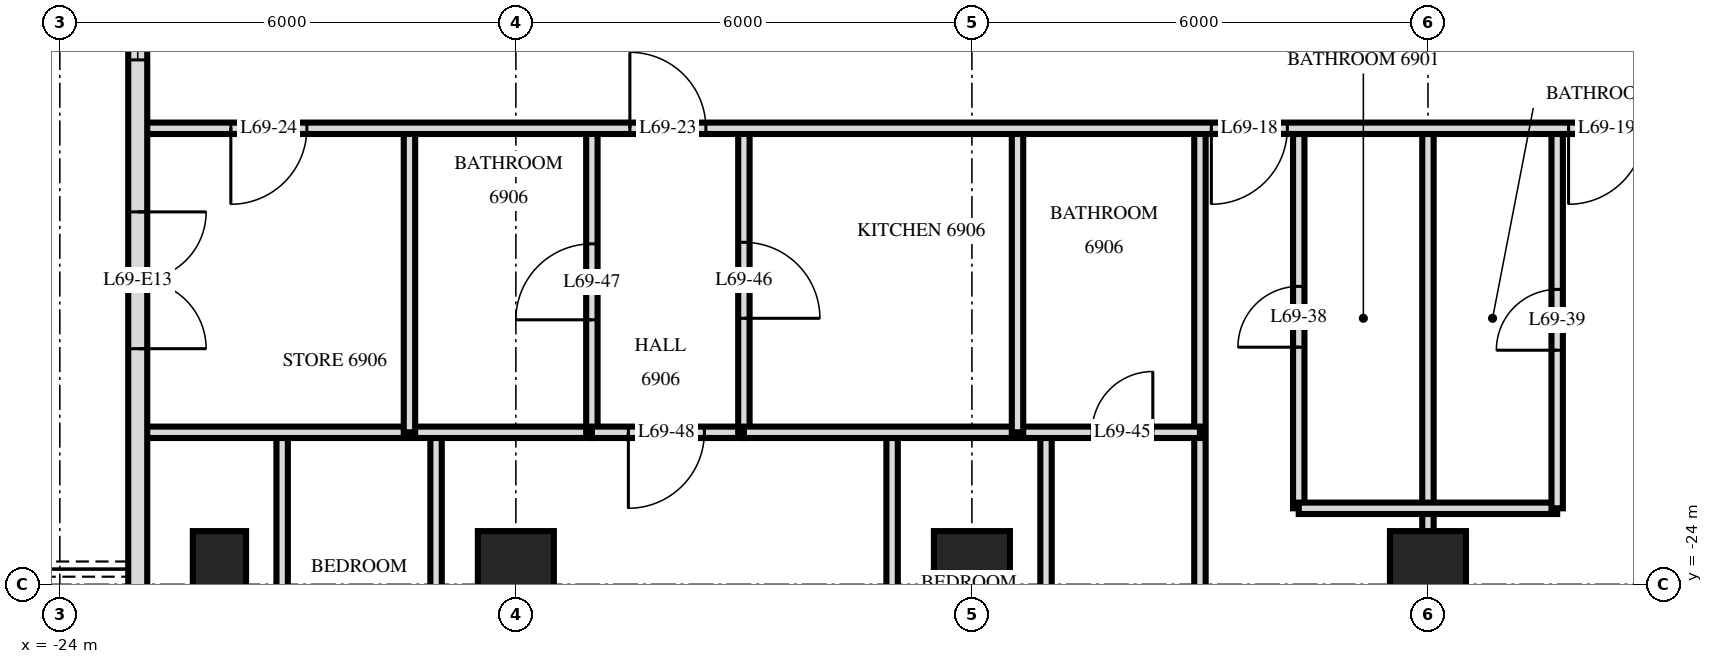
"""IFC4 building model, lengths in metres.
Left out: names, types, materials, properties, quantities, classifications, styles, units other than length and angle.
Written with IfcOpenShell. Run it as: python <this file> out.ifc"""

import sys

from ifc_helpers import new_model, si_unit, direction, frame, frame_2d, origin, origin_2d, place, context, subcontext, project, spatial, rectangle, extrude, element, fill, save


model = new_model("IFC4")
c1 = context("Model", 3, precision=1e-05, world=origin(), true_north=direction((0.0, 1.0)))
c2 = subcontext(c1, "Body", "Model", "MODEL_VIEW")
j1 = project(units=[si_unit("LENGTHUNIT", "METRE"), si_unit("PLANEANGLEUNIT", "RADIAN")], contexts=[c1])
p1 = place(None, origin())
s1 = spatial("IfcSite", under=j1, at=p1, CompositionType="ELEMENT")
p2 = place(p1, origin())
s2 = spatial("IfcBuilding", under=s1, at=p2, CompositionType="ELEMENT")
p3 = place(p2, frame((0.0, 0.0, 263.1)))
s3 = spatial("IfcBuildingStorey", under=s2, at=p3, CompositionType="ELEMENT", Elevation=263.1)
p4 = place(p3, frame((-21.9, -23.8, 0.0), z_axis=(0.0, 0.0, 1.0), x_axis=(0.0, 1.0, 0.0)))
e1 = element("IfcColumn", 1, at=p4, inside=s3, PredefinedType="COLUMN", context=c2, shape_type="SweptSolid", body=[
    extrude(rectangle(XDim=1.0, YDim=0.7, at=origin_2d()), origin(), (0.0, 0.0, 1.0), 3.5),
])
for number, where, z_axis, x_axis in (
    (2, (-18.0, -23.8, 0.0), (0.0, 0.0, 1.0), (1.0, 0.0, 0.0)),
    (3, (-12.0, -23.8, 0.0), (0.0, 0.0, 1.0), (1.0, 0.0, 0.0)),
    (4, (-6.0, -23.8, 0.0), (0.0, 0.0, 1.0), (1.0, 0.0, 0.0)),
):
    element("IfcColumn", number, at=place(p3, frame(where, z_axis=z_axis, x_axis=x_axis)), inside=s3, PredefinedType="COLUMN", context=c2, shape_type="SweptSolid", body=[
        extrude(rectangle(XDim=1.0, YDim=1.0, at=origin_2d()), origin(), (0.0, 0.0, 1.0), 3.5),
    ])
p5 = place(p3, frame((-22.975, -3.325, 0.0), z_axis=(0.0, 0.0, 1.0), x_axis=(0.0, -1.0, 0.0)))
e5 = element("IfcWall", 5, at=p5, inside=s3, PredefinedType="SOLIDWALL", context=c2, shape_type="SweptSolid", body=[
    extrude(rectangle(XDim=25.951, YDim=0.25, at=frame_2d((12.975, 0.0))), origin(), (0.0, 0.0, 1.0), 3.22),
])
p6 = place(p5, frame((1.925, 0.0, 0.0)))
e6 = element("IfcOpeningElement", 6, at=p6, cuts=e5, PredefinedType="OPENING", context=c2, shape_type="SweptSolid", body=[
    extrude(rectangle(XDim=1.8, YDim=2.4, at=frame_2d((0.9, 1.2))), frame((0.0, 0.135, 0.0), z_axis=(0.0, -1.0, 0.0), x_axis=(1.0, 0.0, 0.0)), (0.0, 0.0, 1.0), 0.27),
])
p7 = place(p5, frame((7.975, 0.0, 0.0)))
e7 = element("IfcOpeningElement", 7, at=p7, cuts=e5, PredefinedType="OPENING", context=c2, shape_type="SweptSolid", body=[
    extrude(rectangle(XDim=1.8, YDim=2.4, at=frame_2d((0.9, 1.2))), frame((0.0, 0.135, 0.0), z_axis=(0.0, -1.0, 0.0), x_axis=(1.0, 0.0, 0.0)), (0.0, 0.0, 1.0), 0.27),
])
p8 = place(p5, frame((12.575, 0.0, 0.9)))
e8 = element("IfcOpeningElement", 8, at=p8, cuts=e5, PredefinedType="OPENING", context=c2, shape_type="SweptSolid", body=[
    extrude(rectangle(XDim=1.2, YDim=1.5, at=frame_2d((0.6, 0.75))), frame((0.0, 0.135, 0.0), z_axis=(0.0, -1.0, 0.0), x_axis=(1.0, 0.0, 0.0)), (0.0, 0.0, 1.0), 0.27),
])
p9 = place(p5, frame((15.775, 0.0, 0.0)))
e9 = element("IfcOpeningElement", 9, at=p9, cuts=e5, PredefinedType="OPENING", context=c2, shape_type="SweptSolid", body=[
    extrude(rectangle(XDim=1.8, YDim=2.4, at=frame_2d((0.9, 1.2))), frame((0.0, 0.135, 0.0), z_axis=(0.0, -1.0, 0.0), x_axis=(1.0, 0.0, 0.0)), (0.0, 0.0, 1.0), 0.27),
])
p10 = place(p5, frame((21.075, 0.0, 0.0)))
e10 = element("IfcOpeningElement", 10, at=p10, cuts=e5, PredefinedType="OPENING", context=c2, shape_type="SweptSolid", body=[
    extrude(rectangle(XDim=1.8, YDim=2.4, at=frame_2d((0.9, 1.2))), frame((0.0, 0.135, 0.0), z_axis=(0.0, -1.0, 0.0), x_axis=(1.0, 0.0, 0.0)), (0.0, 0.0, 1.0), 0.27),
])
p11 = place(p5, frame((23.825, 0.0, 0.9)))
e11 = element("IfcOpeningElement", 11, at=p11, cuts=e5, PredefinedType="OPENING", context=c2, shape_type="SweptSolid", body=[
    extrude(rectangle(XDim=1.8, YDim=1.5, at=frame_2d((0.9, 0.75))), frame((0.0, 0.135, 0.0), z_axis=(0.0, -1.0, 0.0), x_axis=(1.0, 0.0, 0.0)), (0.0, 0.0, 1.0), 0.27),
])
p12 = place(p3, frame((-4.3, -23.0, 0.0), z_axis=(0.0, 0.0, 1.0), x_axis=(0.0, 1.0, 0.0)))
e12 = element("IfcWall", 12, at=p12, inside=s3, PredefinedType="PARTITIONING", context=c2, shape_type="SweptSolid", body=[
    extrude(rectangle(XDim=5.0, YDim=0.15, at=frame_2d((2.5, 0.0))), origin(), (0.0, 0.0, 1.0), 3.22),
])
p13 = place(p12, frame((2.08, 0.0, 0.0)))
e13 = element("IfcOpeningElement", 13, at=p13, cuts=e12, PredefinedType="OPENING", context=c2, shape_type="SweptSolid", body=[
    extrude(rectangle(XDim=0.8, YDim=2.1, at=frame_2d((0.4, 1.05))), frame((0.0, 0.085, 0.0), z_axis=(0.0, -1.0, 0.0), x_axis=(1.0, 0.0, 0.0)), (0.0, 0.0, 1.0), 0.17),
])
p14 = place(p3, frame((-6.0, -33.62, 0.0), z_axis=(0.0, 0.0, 1.0), x_axis=(0.0, 1.0, 0.0)))
e14 = element("IfcWall", 14, at=p14, inside=s3, PredefinedType="PARTITIONING", context=c2, shape_type="SweptSolid", body=[
    extrude(rectangle(XDim=15.62, YDim=0.15, at=frame_2d((7.81, 0.0))), origin(), (0.0, 0.0, 1.0), 3.22),
])
p15 = place(p3, frame((-7.7, -23.0, 0.0), z_axis=(0.0, 0.0, 1.0), x_axis=(0.0, 1.0, 0.0)))
e15 = element("IfcWall", 15, at=p15, inside=s3, PredefinedType="PARTITIONING", context=c2, shape_type="SweptSolid", body=[
    extrude(rectangle(XDim=5.0, YDim=0.15, at=frame_2d((2.5, 0.0))), origin(), (0.0, 0.0, 1.0), 3.22),
])
p16 = place(p15, frame((2.12, 0.0, 0.0)))
e16 = element("IfcOpeningElement", 16, at=p16, cuts=e15, PredefinedType="OPENING", context=c2, shape_type="SweptSolid", body=[
    extrude(rectangle(XDim=0.8, YDim=2.1, at=frame_2d((0.4, 1.05))), frame((0.0, 0.085, 0.0), z_axis=(0.0, -1.0, 0.0), x_axis=(1.0, 0.0, 0.0)), (0.0, 0.0, 1.0), 0.17),
])
p17 = place(p3, frame((-9.0, -33.62, 0.0), z_axis=(0.0, 0.0, 1.0), x_axis=(0.0, 1.0, 0.0)))
e17 = element("IfcWall", 17, at=p17, inside=s3, PredefinedType="PARTITIONING", context=c2, shape_type="SweptSolid", body=[
    extrude(rectangle(XDim=15.62, YDim=0.15, at=frame_2d((7.81, 0.0))), origin(), (0.0, 0.0, 1.0), 3.22),
])
p18 = place(p3, frame((-11.025, -33.62, 0.0), z_axis=(0.0, 0.0, 1.0), x_axis=(0.0, 1.0, 0.0)))
e18 = element("IfcWall", 18, at=p18, inside=s3, PredefinedType="PARTITIONING", context=c2, shape_type="SweptSolid", body=[
    extrude(rectangle(XDim=11.62, YDim=0.15, at=frame_2d((5.81, 0.0))), origin(), (0.0, 0.0, 1.0), 3.22),
])
p19 = place(p18, frame((5.25, 0.0, 0.0)))
e19 = element("IfcOpeningElement", 19, at=p19, cuts=e18, PredefinedType="OPENING", context=c2, shape_type="SweptSolid", body=[
    extrude(rectangle(XDim=0.9, YDim=2.1, at=frame_2d((0.45, 1.05))), frame((0.0, 0.085, 0.0), z_axis=(0.0, -1.0, 0.0), x_axis=(1.0, 0.0, 0.0)), (0.0, 0.0, 1.0), 0.17),
])
p20 = place(p3, frame((-11.4, -22.0, 0.0), z_axis=(0.0, 0.0, 1.0), x_axis=(0.0, 1.0, 0.0)))
e20 = element("IfcWall", 20, at=p20, inside=s3, PredefinedType="PARTITIONING", context=c2, shape_type="SweptSolid", body=[
    extrude(rectangle(XDim=4.0, YDim=0.15, at=frame_2d((2.0, 0.0))), origin(), (0.0, 0.0, 1.0), 3.22),
])
p21 = place(p3, frame((-13.05, -33.62, 0.0), z_axis=(0.0, 0.0, 1.0), x_axis=(0.0, 1.0, 0.0)))
e21 = element("IfcWall", 21, at=p21, inside=s3, PredefinedType="PARTITIONING", context=c2, shape_type="SweptSolid", body=[
    extrude(rectangle(XDim=11.62, YDim=0.15, at=frame_2d((5.81, 0.0))), origin(), (0.0, 0.0, 1.0), 3.22),
])
p22 = place(p21, frame((5.25, 0.0, 0.0)))
e22 = element("IfcOpeningElement", 22, at=p22, cuts=e21, PredefinedType="OPENING", context=c2, shape_type="SweptSolid", body=[
    extrude(rectangle(XDim=0.9, YDim=2.1, at=frame_2d((0.45, 1.05))), frame((0.0, 0.085, 0.0), z_axis=(0.0, -1.0, 0.0), x_axis=(1.0, 0.0, 0.0)), (0.0, 0.0, 1.0), 0.17),
])
p23 = place(p3, frame((-15.0, -22.0, 0.0), z_axis=(0.0, 0.0, 1.0), x_axis=(0.0, 1.0, 0.0)))
e23 = element("IfcWall", 23, at=p23, inside=s3, PredefinedType="PARTITIONING", context=c2, shape_type="SweptSolid", body=[
    extrude(rectangle(XDim=4.0, YDim=0.15, at=frame_2d((2.0, 0.0))), origin(), (0.0, 0.0, 1.0), 3.22),
])
p24 = place(p23, frame((1.5, 0.0, 0.0)))
e24 = element("IfcOpeningElement", 24, at=p24, cuts=e23, PredefinedType="OPENING", context=c2, shape_type="SweptSolid", body=[
    extrude(rectangle(XDim=1.0, YDim=2.1, at=frame_2d((0.5, 1.05))), frame((0.0, 0.085, 0.0), z_axis=(0.0, -1.0, 0.0), x_axis=(1.0, 0.0, 0.0)), (0.0, 0.0, 1.0), 0.17),
])
p25 = place(p3, frame((-17.0, -22.0, 0.0), z_axis=(0.0, 0.0, 1.0), x_axis=(0.0, 1.0, 0.0)))
e25 = element("IfcWall", 25, at=p25, inside=s3, PredefinedType="PARTITIONING", context=c2, shape_type="SweptSolid", body=[
    extrude(rectangle(XDim=4.0, YDim=0.15, at=frame_2d((2.0, 0.0))), origin(), (0.0, 0.0, 1.0), 3.22),
])
p26 = place(p25, frame((1.48, 0.0, 0.0)))
e26 = element("IfcOpeningElement", 26, at=p26, cuts=e25, PredefinedType="OPENING", context=c2, shape_type="SweptSolid", body=[
    extrude(rectangle(XDim=1.0, YDim=2.1, at=frame_2d((0.5, 1.05))), frame((0.0, 0.085, 0.0), z_axis=(0.0, -1.0, 0.0), x_axis=(1.0, 0.0, 0.0)), (0.0, 0.0, 1.0), 0.17),
])
p27 = place(p3, frame((-19.05, -33.527, 0.0), z_axis=(0.0, 0.0, 1.0), x_axis=(0.0, 1.0, 0.0)))
e27 = element("IfcWall", 27, at=p27, inside=s3, PredefinedType="PARTITIONING", context=c2, shape_type="SweptSolid", body=[
    extrude(rectangle(XDim=11.527, YDim=0.15, at=frame_2d((5.764, 0.0))), origin(), (0.0, 0.0, 1.0), 3.22),
])
p28 = place(p27, frame((5.236, 0.0, 0.0)))
e28 = element("IfcOpeningElement", 28, at=p28, cuts=e27, PredefinedType="OPENING", context=c2, shape_type="SweptSolid", body=[
    extrude(rectangle(XDim=0.9, YDim=2.1, at=frame_2d((0.45, 1.05))), frame((0.0, 0.085, 0.0), z_axis=(0.0, -1.0, 0.0), x_axis=(1.0, 0.0, 0.0)), (0.0, 0.0, 1.0), 0.17),
])
p29 = place(p3, frame((-19.4, -22.0, 0.0), z_axis=(0.0, 0.0, 1.0), x_axis=(0.0, 1.0, 0.0)))
e29 = element("IfcWall", 29, at=p29, inside=s3, PredefinedType="PARTITIONING", context=c2, shape_type="SweptSolid", body=[
    extrude(rectangle(XDim=4.0, YDim=0.15, at=frame_2d((2.0, 0.0))), origin(), (0.0, 0.0, 1.0), 3.22),
])
p30 = place(p3, frame((-21.075, -32.666, 0.0), z_axis=(0.0, 0.0, 1.0), x_axis=(0.0, 1.0, 0.0)))
e30 = element("IfcWall", 30, at=p30, inside=s3, PredefinedType="PARTITIONING", context=c2, shape_type="SweptSolid", body=[
    extrude(rectangle(XDim=10.666, YDim=0.15, at=frame_2d((5.333, 0.0))), origin(), (0.0, 0.0, 1.0), 3.22),
])
p31 = place(p30, frame((4.732, 0.0, 0.0)))
e31 = element("IfcOpeningElement", 31, at=p31, cuts=e30, PredefinedType="OPENING", context=c2, shape_type="SweptSolid", body=[
    extrude(rectangle(XDim=0.9, YDim=2.1, at=frame_2d((0.45, 1.05))), frame((0.0, 0.085, 0.0), z_axis=(0.0, -1.0, 0.0), x_axis=(1.0, 0.0, 0.0)), (0.0, 0.0, 1.0), 0.17),
])
p32 = place(p3, frame((-7.7, -23.0, 0.0), z_axis=(0.0, 0.0, 1.0), x_axis=(1.0, 0.0, 0.0)))
e32 = element("IfcWall", 32, at=p32, inside=s3, PredefinedType="PARTITIONING", context=c2, shape_type="SweptSolid", body=[
    extrude(rectangle(XDim=3.4, YDim=0.15, at=frame_2d((1.7, 0.0))), origin(), (0.0, 0.0, 1.0), 3.22),
])
p33 = place(p3, frame((-17.0, -22.0, 0.0), z_axis=(0.0, 0.0, 1.0), x_axis=(1.0, 0.0, 0.0)))
e33 = element("IfcWall", 33, at=p33, inside=s3, PredefinedType="PARTITIONING", context=c2, shape_type="SweptSolid", body=[
    extrude(rectangle(XDim=2.0, YDim=0.15, at=frame_2d((1.0, 0.0))), origin(), (0.0, 0.0, 1.0), 3.22),
])
p34 = place(p33, frame((0.48, 0.0, 0.0)))
e34 = element("IfcOpeningElement", 34, at=p34, cuts=e33, PredefinedType="OPENING", context=c2, shape_type="SweptSolid", body=[
    extrude(rectangle(XDim=1.0, YDim=2.1, at=frame_2d((0.5, 1.05))), frame((0.0, 0.085, 0.0), z_axis=(0.0, -1.0, 0.0), x_axis=(1.0, 0.0, 0.0)), (0.0, 0.0, 1.0), 0.17),
])
p35 = place(p3, frame((-22.92, -22.0, 0.0), z_axis=(0.0, 0.0, 1.0), x_axis=(1.0, 0.0, 0.0)))
e35 = element("IfcWall", 35, at=p35, inside=s3, PredefinedType="PARTITIONING", context=c2, shape_type="SweptSolid", body=[
    extrude(rectangle(XDim=5.92, YDim=0.15, at=frame_2d((2.96, 0.0))), origin(), (0.0, 0.0, 1.0), 3.22),
])
p36 = place(p3, frame((-15.0, -22.0, 0.0), z_axis=(0.0, 0.0, 1.0), x_axis=(1.0, 0.0, 0.0)))
e36 = element("IfcWall", 36, at=p36, inside=s3, PredefinedType="PARTITIONING", context=c2, shape_type="SweptSolid", body=[
    extrude(rectangle(XDim=6.0, YDim=0.15, at=frame_2d((3.0, 0.0))), origin(), (0.0, 0.0, 1.0), 3.22),
])
p37 = place(p36, frame((4.58, 0.0, 0.0)))
e37 = element("IfcOpeningElement", 37, at=p37, cuts=e36, PredefinedType="OPENING", context=c2, shape_type="SweptSolid", body=[
    extrude(rectangle(XDim=0.8, YDim=2.1, at=frame_2d((0.4, 1.05))), frame((0.0, 0.085, 0.0), z_axis=(0.0, -1.0, 0.0), x_axis=(1.0, 0.0, 0.0)), (0.0, 0.0, 1.0), 0.17),
])
p38 = place(p3, frame((-22.92, -18.0, 0.0), z_axis=(0.0, 0.0, 1.0), x_axis=(1.0, 0.0, 0.0)))
e38 = element("IfcWall", 38, at=p38, inside=s3, PredefinedType="PARTITIONING", context=c2, shape_type="SweptSolid", body=[
    extrude(rectangle(XDim=45.84, YDim=0.15, at=frame_2d((22.92, 0.0))), origin(), (0.0, 0.0, 1.0), 3.22),
])
p39 = place(p38, frame((14.07, 0.0, 0.0)))
e39 = element("IfcOpeningElement", 39, at=p39, cuts=e38, PredefinedType="OPENING", context=c2, shape_type="SweptSolid", body=[
    extrude(rectangle(XDim=1.0, YDim=2.1, at=frame_2d((0.5, 1.05))), frame((0.0, 0.085, 0.0), z_axis=(0.0, -1.0, 0.0), x_axis=(1.0, 0.0, 0.0)), (0.0, 0.0, 1.0), 0.17),
])
p40 = place(p38, frame((18.77, 0.0, 0.0)))
e40 = element("IfcOpeningElement", 40, at=p40, cuts=e38, PredefinedType="OPENING", context=c2, shape_type="SweptSolid", body=[
    extrude(rectangle(XDim=1.0, YDim=2.1, at=frame_2d((0.5, 1.05))), frame((0.0, 0.085, 0.0), z_axis=(0.0, -1.0, 0.0), x_axis=(1.0, 0.0, 0.0)), (0.0, 0.0, 1.0), 0.17),
])
p41 = place(p38, frame((20.07, 0.0, 0.0)))
e41 = element("IfcOpeningElement", 41, at=p41, cuts=e38, PredefinedType="OPENING", context=c2, shape_type="SweptSolid", body=[
    extrude(rectangle(XDim=1.0, YDim=2.1, at=frame_2d((0.5, 1.05))), frame((0.0, 0.085, 0.0), z_axis=(0.0, -1.0, 0.0), x_axis=(1.0, 0.0, 0.0)), (0.0, 0.0, 1.0), 0.17),
])
p42 = place(p38, frame((25.57, 0.0, 0.0)))
e42 = element("IfcOpeningElement", 42, at=p42, cuts=e38, PredefinedType="OPENING", context=c2, shape_type="SweptSolid", body=[
    extrude(rectangle(XDim=1.0, YDim=2.1, at=frame_2d((0.5, 1.05))), frame((0.0, 0.085, 0.0), z_axis=(0.0, -1.0, 0.0), x_axis=(1.0, 0.0, 0.0)), (0.0, 0.0, 1.0), 0.17),
])
p43 = place(p38, frame((29.07, 0.0, 0.0)))
e43 = element("IfcOpeningElement", 43, at=p43, cuts=e38, PredefinedType="OPENING", context=c2, shape_type="SweptSolid", body=[
    extrude(rectangle(XDim=1.0, YDim=2.1, at=frame_2d((0.5, 1.05))), frame((0.0, 0.085, 0.0), z_axis=(0.0, -1.0, 0.0), x_axis=(1.0, 0.0, 0.0)), (0.0, 0.0, 1.0), 0.17),
])
p44 = place(p38, frame((6.42, 0.0, 0.0)))
e44 = element("IfcOpeningElement", 44, at=p44, cuts=e38, PredefinedType="OPENING", context=c2, shape_type="SweptSolid", body=[
    extrude(rectangle(XDim=1.0, YDim=2.1, at=frame_2d((0.5, 1.05))), frame((0.0, 0.085, 0.0), z_axis=(0.0, -1.0, 0.0), x_axis=(1.0, 0.0, 0.0)), (0.0, 0.0, 1.0), 0.17),
])
p45 = place(p38, frame((1.17, 0.0, 0.0)))
e45 = element("IfcOpeningElement", 45, at=p45, cuts=e38, PredefinedType="OPENING", context=c2, shape_type="SweptSolid", body=[
    extrude(rectangle(XDim=1.0, YDim=2.1, at=frame_2d((0.5, 1.05))), frame((0.0, 0.085, 0.0), z_axis=(0.0, -1.0, 0.0), x_axis=(1.0, 0.0, 0.0)), (0.0, 0.0, 1.0), 0.17),
])
p46 = place(p38, frame((38.42, 0.0, 0.0)))
e46 = element("IfcOpeningElement", 46, at=p46, cuts=e38, PredefinedType="OPENING", context=c2, shape_type="SweptSolid", body=[
    extrude(rectangle(XDim=1.0, YDim=2.1, at=frame_2d((0.5, 1.05))), frame((0.0, 0.085, 0.0), z_axis=(0.0, -1.0, 0.0), x_axis=(1.0, 0.0, 0.0)), (0.0, 0.0, 1.0), 0.17),
])
p47 = place(p38, frame((43.67, 0.0, 0.0)))
e47 = element("IfcOpeningElement", 47, at=p47, cuts=e38, PredefinedType="OPENING", context=c2, shape_type="SweptSolid", body=[
    extrude(rectangle(XDim=1.0, YDim=2.1, at=frame_2d((0.5, 1.05))), frame((0.0, 0.085, 0.0), z_axis=(0.0, -1.0, 0.0), x_axis=(1.0, 0.0, 0.0)), (0.0, 0.0, 1.0), 0.17),
])
p48 = place(p8, origin())
e48 = element("IfcWindow", 48, at=p48, inside=s3, PartitioningType="SINGLE_PANEL", PredefinedType="WINDOW", context=c2, shape_type="SweptSolid", body=[
    extrude(rectangle(XDim=1.2, YDim=1.5, at=frame_2d((0.6, 0.75))), frame((0.0, 0.03, 0.0), z_axis=(0.0, -1.0, 0.0), x_axis=(1.0, 0.0, 0.0)), (0.0, 0.0, 1.0), 0.06),
])
fill(e8, e48)
p49 = place(p9, origin())
e49 = element("IfcDoor", 49, at=p49, inside=s3, OperationType="DOUBLE_DOOR_SINGLE_SWING", PredefinedType="DOOR", context=c2, shape_type="SweptSolid", body=[
    extrude(rectangle(XDim=1.8, YDim=2.4, at=frame_2d((0.9, 1.2))), frame((0.0, 0.025, 0.0), z_axis=(0.0, -1.0, 0.0), x_axis=(1.0, 0.0, 0.0)), (0.0, 0.0, 1.0), 0.05),
])
fill(e9, e49)
p50 = place(p39, frame((0.5, 0.0, 0.0), z_axis=(0.0, 0.0, 1.0), x_axis=(-1.0, 0.0, 0.0)))
e50 = element("IfcDoor", 50, at=p50, inside=s3, OperationType="SINGLE_SWING_LEFT", PredefinedType="DOOR", context=c2, shape_type="SweptSolid", body=[
    extrude(rectangle(XDim=1.0, YDim=2.1, at=frame_2d((0.0, 1.05))), frame((0.0, -0.025, 0.0), z_axis=(0.0, 1.0, 0.0), x_axis=(-1.0, 0.0, 0.0)), (0.0, 0.0, 1.0), 0.05),
])
fill(e39, e50)
p51 = place(p40, frame((0.5, 0.0, 0.0), z_axis=(0.0, 0.0, 1.0), x_axis=(-1.0, 0.0, 0.0)))
e51 = element("IfcDoor", 51, at=p51, inside=s3, OperationType="SINGLE_SWING_LEFT", PredefinedType="DOOR", context=c2, shape_type="SweptSolid", body=[
    extrude(rectangle(XDim=1.0, YDim=2.1, at=frame_2d((0.0, 1.05))), frame((0.0, -0.025, 0.0), z_axis=(0.0, 1.0, 0.0), x_axis=(-1.0, 0.0, 0.0)), (0.0, 0.0, 1.0), 0.05),
])
fill(e40, e51)
p52 = place(p44, origin())
e52 = element("IfcDoor", 52, at=p52, inside=s3, OperationType="SINGLE_SWING_RIGHT", PredefinedType="DOOR", context=c2, shape_type="SweptSolid", body=[
    extrude(rectangle(XDim=1.0, YDim=2.1, at=frame_2d((0.5, 1.05))), frame((0.0, 0.025, 0.0), z_axis=(0.0, -1.0, 0.0), x_axis=(1.0, 0.0, 0.0)), (0.0, 0.0, 1.0), 0.05),
])
fill(e44, e52)
p53 = place(p45, frame((0.5, 0.0, 0.0), z_axis=(0.0, 0.0, 1.0), x_axis=(-1.0, 0.0, 0.0)))
e53 = element("IfcDoor", 53, at=p53, inside=s3, OperationType="SINGLE_SWING_LEFT", PredefinedType="DOOR", context=c2, shape_type="SweptSolid", body=[
    extrude(rectangle(XDim=1.0, YDim=2.1, at=frame_2d((0.0, 1.05))), frame((0.0, -0.025, 0.0), z_axis=(0.0, 1.0, 0.0), x_axis=(-1.0, 0.0, 0.0)), (0.0, 0.0, 1.0), 0.05),
])
fill(e45, e53)
p54 = place(p16, origin())
e54 = element("IfcDoor", 54, at=p54, inside=s3, OperationType="SINGLE_SWING_RIGHT", PredefinedType="DOOR", context=c2, shape_type="SweptSolid", body=[
    extrude(rectangle(XDim=0.8, YDim=2.1, at=frame_2d((0.4, 1.05))), frame((0.0, 0.025, 0.0), z_axis=(0.0, -1.0, 0.0), x_axis=(1.0, 0.0, 0.0)), (0.0, 0.0, 1.0), 0.05),
])
fill(e16, e54)
p55 = place(p13, origin())
e55 = element("IfcDoor", 55, at=p55, inside=s3, OperationType="SINGLE_SWING_RIGHT", PredefinedType="DOOR", context=c2, shape_type="SweptSolid", body=[
    extrude(rectangle(XDim=0.8, YDim=2.1, at=frame_2d((0.4, 1.05))), frame((0.0, 0.025, 0.0), z_axis=(0.0, -1.0, 0.0), x_axis=(1.0, 0.0, 0.0)), (0.0, 0.0, 1.0), 0.05),
])
fill(e13, e55)
p56 = place(p37, origin())
e56 = element("IfcDoor", 56, at=p56, inside=s3, OperationType="SINGLE_SWING_LEFT", PredefinedType="DOOR", context=c2, shape_type="SweptSolid", body=[
    extrude(rectangle(XDim=0.8, YDim=2.1, at=frame_2d((0.4, 1.05))), frame((0.0, 0.025, 0.0), z_axis=(0.0, -1.0, 0.0), x_axis=(1.0, 0.0, 0.0)), (0.0, 0.0, 1.0), 0.05),
])
fill(e37, e56)
p57 = place(p24, frame((0.5, 0.0, 0.0), z_axis=(0.0, 0.0, 1.0), x_axis=(-1.0, 0.0, 0.0)))
e57 = element("IfcDoor", 57, at=p57, inside=s3, OperationType="SINGLE_SWING_LEFT", PredefinedType="DOOR", context=c2, shape_type="SweptSolid", body=[
    extrude(rectangle(XDim=1.0, YDim=2.1, at=frame_2d((0.0, 1.05))), frame((0.0, -0.025, 0.0), z_axis=(0.0, 1.0, 0.0), x_axis=(-1.0, 0.0, 0.0)), (0.0, 0.0, 1.0), 0.05),
])
fill(e24, e57)
p58 = place(p26, origin())
e58 = element("IfcDoor", 58, at=p58, inside=s3, OperationType="SINGLE_SWING_RIGHT", PredefinedType="DOOR", context=c2, shape_type="SweptSolid", body=[
    extrude(rectangle(XDim=1.0, YDim=2.1, at=frame_2d((0.5, 1.05))), frame((0.0, 0.025, 0.0), z_axis=(0.0, -1.0, 0.0), x_axis=(1.0, 0.0, 0.0)), (0.0, 0.0, 1.0), 0.05),
])
fill(e26, e58)
p59 = place(p34, frame((0.5, 0.0, 0.0), z_axis=(0.0, 0.0, 1.0), x_axis=(-1.0, 0.0, 0.0)))
e59 = element("IfcDoor", 59, at=p59, inside=s3, OperationType="SINGLE_SWING_LEFT", PredefinedType="DOOR", context=c2, shape_type="SweptSolid", body=[
    extrude(rectangle(XDim=1.0, YDim=2.1, at=frame_2d((0.0, 1.05))), frame((0.0, -0.025, 0.0), z_axis=(0.0, 1.0, 0.0), x_axis=(-1.0, 0.0, 0.0)), (0.0, 0.0, 1.0), 0.05),
])
fill(e34, e59)
save(model, sys.argv[1])
